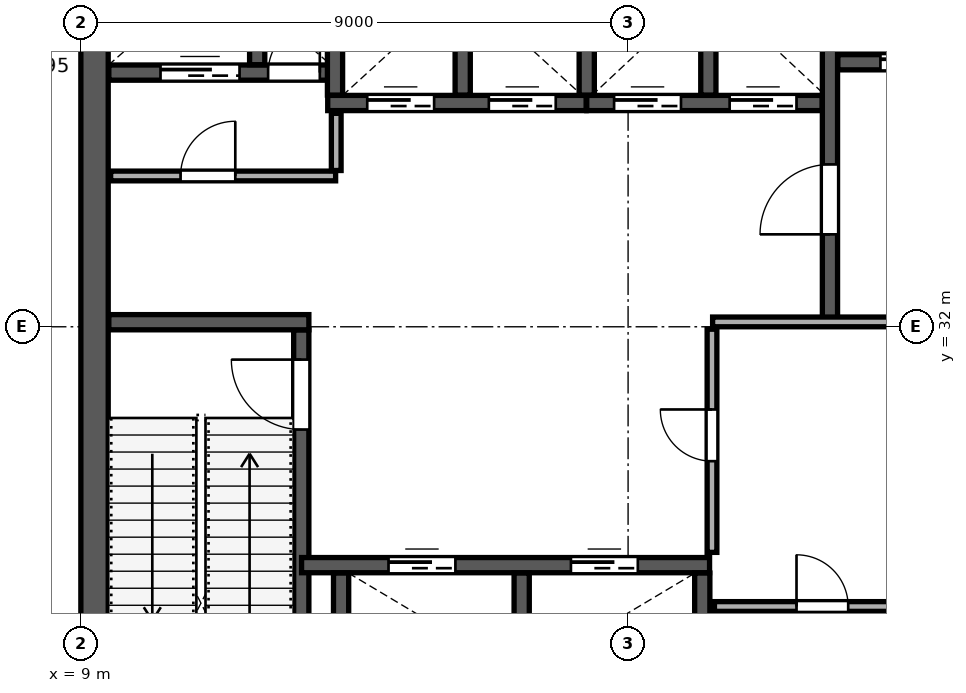
"""IFC4 building model, lengths in metres.
Left out: names, types, materials, properties, quantities, classifications, styles, units other than length and angle.
Written with IfcOpenShell. Run it as: python <this file> out.ifc"""

import sys

from ifc_helpers import new_model, si_unit, direction, frame, frame_2d, origin, place, context, subcontext, project, spatial, rectangle, extrude, source, transform, mapped, element, fill, save


model = new_model("IFC4")
c1 = context("Model", 3, precision=1e-05, world=origin(), true_north=direction((0.0, 1.0)))
c2 = subcontext(c1, "Body", "Model", "MODEL_VIEW")
j1 = project(units=[si_unit("LENGTHUNIT", "METRE"), si_unit("PLANEANGLEUNIT", "RADIAN")], contexts=[c1])
p1 = place(None, origin())
s1 = spatial("IfcSite", under=j1, at=p1, CompositionType="ELEMENT")
p2 = place(p1, origin())
s2 = spatial("IfcBuilding", under=s1, at=p2, CompositionType="ELEMENT")
p3 = place(p2, frame((0.0, 0.0, 127.6)))
s3 = spatial("IfcBuildingStorey", under=s2, at=p3, CompositionType="ELEMENT", Elevation=127.6)
p4 = place(p3, frame((9.225, 24.45, 0.0), z_axis=(0.0, 0.0, 1.0), x_axis=(0.0, 1.0, 0.0)))
e1 = element("IfcWall", 1, at=p4, inside=s3, PredefinedType="SHEAR", context=c2, shape_type="SweptSolid", body=[
    extrude(rectangle(XDim=15.1, YDim=0.45, at=frame_2d((7.55, 0.0))), origin(), (0.0, 0.0, 1.0), 5.16),
])
p5 = place(p3, frame((12.625, 24.46, 0.0), z_axis=(0.0, 0.0, 1.0), x_axis=(0.0, 1.0, 0.0)))
e2 = element("IfcWall", 2, at=p5, inside=s3, PredefinedType="SHEAR", context=c2, shape_type="SweptSolid", body=[
    extrude(rectangle(XDim=7.49, YDim=0.25, at=frame_2d((3.745, 0.0))), origin(), (0.0, 0.0, 1.0), 5.16),
])
p6 = place(p5, frame((5.85, 0.0, 0.0)))
e3 = element("IfcOpeningElement", 3, at=p6, cuts=e2, PredefinedType="OPENING", context=c2, shape_type="SweptSolid", body=[
    extrude(rectangle(XDim=1.15, YDim=2.2, at=frame_2d((0.575, 1.1))), frame((0.0, 0.135, 0.0), z_axis=(0.0, -1.0, 0.0), x_axis=(1.0, 0.0, 0.0)), (0.0, 0.0, 1.0), 0.27),
])
p7 = place(p3, frame((9.46, 32.075, 0.0), z_axis=(0.0, 0.0, 1.0), x_axis=(1.0, 0.0, 0.0)))
e4 = element("IfcWall", 4, at=p7, inside=s3, PredefinedType="SHEAR", context=c2, shape_type="SweptSolid", body=[
    extrude(rectangle(XDim=3.29, YDim=0.25, at=frame_2d((1.645, 0.0))), origin(), (0.0, 0.0, 1.0), 5.16),
])
p8 = place(p3, frame((21.32, 32.12, 0.0), z_axis=(0.0, 0.0, 1.0), x_axis=(0.0, 1.0, 0.0)))
e5 = element("IfcWall", 5, at=p8, inside=s3, PredefinedType="SHEAR", context=c2, shape_type="SweptSolid", body=[
    extrude(rectangle(XDim=7.42, YDim=0.25, at=frame_2d((3.71, 0.0))), origin(), (0.0, 0.0, 1.0), 5.16),
])
p9 = place(p8, frame((1.4, 0.0, 0.0)))
e6 = element("IfcOpeningElement", 6, at=p9, cuts=e5, PredefinedType="OPENING", context=c2, shape_type="SweptSolid", body=[
    extrude(rectangle(XDim=1.15, YDim=2.2, at=frame_2d((0.575, 1.1))), frame((0.0, 0.135, 0.0), z_axis=(0.0, -1.0, 0.0), x_axis=(1.0, 0.0, 0.0)), (0.0, 0.0, 1.0), 0.27),
])
p10 = place(p3, frame((9.46, 36.18, 0.0), z_axis=(0.0, 0.0, 1.0), x_axis=(1.0, 0.0, 0.0)))
e7 = element("IfcWall", 7, at=p10, inside=s3, PredefinedType="SHEAR", context=c2, shape_type="SweptSolid", body=[
    extrude(rectangle(XDim=3.79, YDim=0.25, at=frame_2d((1.895, 0.0))), origin(), (0.0, 0.0, 1.0), 5.16),
])
p11 = place(p10, frame((2.62, 0.0, 0.0)))
e8 = element("IfcOpeningElement", 8, at=p11, cuts=e7, PredefinedType="OPENING", context=c2, shape_type="SweptSolid", body=[
    extrude(rectangle(XDim=0.85, YDim=2.1, at=frame_2d((0.425, 1.05))), frame((0.0, 0.135, 0.0), z_axis=(0.0, -1.0, 0.0), x_axis=(1.0, 0.0, 0.0)), (0.0, 0.0, 1.0), 0.27),
])
p12 = place(p10, frame((0.85, 0.0, 0.0)))
e9 = element("IfcOpeningElement", 9, at=p12, cuts=e7, PredefinedType="OPENING", context=c2, shape_type="SweptSolid", body=[
    extrude(rectangle(XDim=1.3, YDim=2.25, at=frame_2d((0.65, 1.125))), frame((0.0, 0.135, 0.0), z_axis=(0.0, -1.0, 0.0), x_axis=(1.0, 0.0, 0.0)), (0.0, 0.0, 1.0), 0.27),
])
p13 = place(p3, frame((11.9, 36.31, 0.0), z_axis=(0.0, 0.0, 1.0), x_axis=(0.0, 1.0, 0.0)))
e10 = element("IfcWall", 10, at=p13, inside=s3, PredefinedType="SHEAR", context=c2, shape_type="SweptSolid", body=[
    extrude(rectangle(XDim=3.23, YDim=0.25, at=frame_2d((1.615, 0.0))), origin(), (0.0, 0.0, 1.0), 5.16),
])
p14 = place(p3, frame((21.45, 36.35, 0.0), z_axis=(0.0, 0.0, 1.0), x_axis=(1.0, 0.0, 0.0)))
e11 = element("IfcWall", 11, at=p14, inside=s3, PredefinedType="SHEAR", context=c2, shape_type="SweptSolid", body=[
    extrude(rectangle(XDim=5.09, YDim=0.25, at=frame_2d((2.545, 0.0))), origin(), (0.0, 0.0, 1.0), 5.16),
])
p15 = place(p14, frame((0.7, 0.0, 0.0)))
e12 = element("IfcOpeningElement", 12, at=p15, cuts=e11, PredefinedType="OPENING", context=c2, shape_type="SweptSolid", body=[
    extrude(rectangle(XDim=1.2, YDim=2.2, at=frame_2d((0.6, 1.1))), frame((0.0, 0.135, 0.0), z_axis=(0.0, -1.0, 0.0), x_axis=(1.0, 0.0, 0.0)), (0.0, 0.0, 1.0), 0.27),
])
p16 = place(p14, frame((3.25, 0.0, 0.0)))
e13 = element("IfcOpeningElement", 13, at=p16, cuts=e11, PredefinedType="OPENING", context=c2, shape_type="SweptSolid", body=[
    extrude(rectangle(XDim=1.2, YDim=2.2, at=frame_2d((0.6, 1.1))), frame((0.0, 0.135, 0.0), z_axis=(0.0, -1.0, 0.0), x_axis=(1.0, 0.0, 0.0)), (0.0, 0.0, 1.0), 0.27),
])
p17 = place(p3, frame((12.63, 28.08, 0.0), z_axis=(0.0, 0.0, 1.0), x_axis=(1.0, 0.0, 0.0)))
e14 = element("IfcWall", 14, at=p17, inside=s3, PredefinedType="SHEAR", context=c2, shape_type="SweptSolid", body=[
    extrude(rectangle(XDim=6.71, YDim=0.25, at=frame_2d((3.355, 0.0))), origin(), (0.0, 0.0, 1.0), 5.16),
])
p18 = place(p17, frame((1.43, 0.0, 0.0)))
e15 = element("IfcOpeningElement", 15, at=p18, cuts=e14, PredefinedType="OPENING", context=c2, shape_type="SweptSolid", body=[
    extrude(rectangle(XDim=1.1, YDim=2.2, at=frame_2d((0.55, 1.1))), frame((0.0, 0.135, 0.0), z_axis=(0.0, -1.0, 0.0), x_axis=(1.0, 0.0, 0.0)), (0.0, 0.0, 1.0), 0.27),
])
p19 = place(p17, frame((4.43, 0.0, 0.0)))
e16 = element("IfcOpeningElement", 16, at=p19, cuts=e14, PredefinedType="OPENING", context=c2, shape_type="SweptSolid", body=[
    extrude(rectangle(XDim=1.1, YDim=2.2, at=frame_2d((0.55, 1.1))), frame((0.0, 0.135, 0.0), z_axis=(0.0, -1.0, 0.0), x_axis=(1.0, 0.0, 0.0)), (0.0, 0.0, 1.0), 0.27),
])
for number, where, z_axis, x_axis in (
    (17, (13.28, 24.46, 0.0), (0.0, 0.0, 1.0), (0.0, 1.0, 0.0)),
    (18, (16.25, 24.46, 0.0), (0.0, 0.0, 1.0), (0.0, 1.0, 0.0)),
    (19, (19.22, 24.46, 0.0), (0.0, 0.0, 1.0), (0.0, 1.0, 0.0)),
):
    element("IfcWall", number, at=place(p3, frame(where, z_axis=z_axis, x_axis=x_axis)), inside=s3, PredefinedType="SHEAR", context=c2, shape_type="SweptSolid", body=[
        extrude(rectangle(XDim=3.49, YDim=0.25, at=frame_2d((1.745, 0.0))), origin(), (0.0, 0.0, 1.0), 5.16),
    ])
p20 = place(p3, frame((13.06, 35.68, 0.0), z_axis=(0.0, 0.0, 1.0), x_axis=(1.0, 0.0, 0.0)))
e20 = element("IfcWall", 20, at=p20, inside=s3, PredefinedType="SHEAR", context=c2, shape_type="SweptSolid", body=[
    extrude(rectangle(XDim=4.25, YDim=0.25, at=frame_2d((2.125, 0.0))), origin(), (0.0, 0.0, 1.0), 5.16),
])
p21 = place(p20, frame((0.65, 0.0, 0.0)))
e21 = element("IfcOpeningElement", 21, at=p21, cuts=e20, PredefinedType="OPENING", context=c2, shape_type="SweptSolid", body=[
    extrude(rectangle(XDim=1.1, YDim=2.2, at=frame_2d((0.55, 1.1))), frame((0.0, 0.135, 0.0), z_axis=(0.0, -1.0, 0.0), x_axis=(1.0, 0.0, 0.0)), (0.0, 0.0, 1.0), 0.27),
])
p22 = place(p20, frame((2.65, 0.0, 0.0)))
e22 = element("IfcOpeningElement", 22, at=p22, cuts=e20, PredefinedType="OPENING", context=c2, shape_type="SweptSolid", body=[
    extrude(rectangle(XDim=1.1, YDim=2.2, at=frame_2d((0.55, 1.1))), frame((0.0, 0.135, 0.0), z_axis=(0.0, -1.0, 0.0), x_axis=(1.0, 0.0, 0.0)), (0.0, 0.0, 1.0), 0.27),
])
for number, where, z_axis, x_axis in (
    (23, (13.18, 35.81, 0.0), (0.0, 0.0, 1.0), (0.0, 1.0, 0.0)),
    (24, (15.28, 35.81, 0.0), (0.0, 0.0, 1.0), (0.0, 1.0, 0.0)),
):
    element("IfcWall", number, at=place(p3, frame(where, z_axis=z_axis, x_axis=x_axis)), inside=s3, PredefinedType="SHEAR", context=c2, shape_type="SweptSolid", body=[
        extrude(rectangle(XDim=3.73, YDim=0.25, at=frame_2d((1.865, 0.0))), origin(), (0.0, 0.0, 1.0), 5.16),
    ])
p23 = place(p3, frame((17.32, 35.68, 0.0), z_axis=(0.0, 0.0, 1.0), x_axis=(1.0, 0.0, 0.0)))
e25 = element("IfcWall", 25, at=p23, inside=s3, PredefinedType="SHEAR", context=c2, shape_type="SweptSolid", body=[
    extrude(rectangle(XDim=3.87, YDim=0.25, at=frame_2d((1.935, 0.0))), origin(), (0.0, 0.0, 1.0), 5.16),
])
p24 = place(p23, frame((0.45, 0.0, 0.0)))
e26 = element("IfcOpeningElement", 26, at=p24, cuts=e25, PredefinedType="OPENING", context=c2, shape_type="SweptSolid", body=[
    extrude(rectangle(XDim=1.1, YDim=2.2, at=frame_2d((0.55, 1.1))), frame((0.0, 0.135, 0.0), z_axis=(0.0, -1.0, 0.0), x_axis=(1.0, 0.0, 0.0)), (0.0, 0.0, 1.0), 0.27),
])
p25 = place(p23, frame((2.35, 0.0, 0.0)))
e27 = element("IfcOpeningElement", 27, at=p25, cuts=e25, PredefinedType="OPENING", context=c2, shape_type="SweptSolid", body=[
    extrude(rectangle(XDim=1.1, YDim=2.2, at=frame_2d((0.55, 1.1))), frame((0.0, 0.135, 0.0), z_axis=(0.0, -1.0, 0.0), x_axis=(1.0, 0.0, 0.0)), (0.0, 0.0, 1.0), 0.27),
])
for number, where, z_axis, x_axis in (
    (28, (17.32, 35.81, 0.0), (0.0, 0.0, 1.0), (0.0, 1.0, 0.0)),
    (29, (19.32, 35.81, 0.0), (0.0, 0.0, 1.0), (0.0, 1.0, 0.0)),
):
    element("IfcWall", number, at=place(p3, frame(where, z_axis=z_axis, x_axis=x_axis)), inside=s3, PredefinedType="SHEAR", context=c2, shape_type="SweptSolid", body=[
        extrude(rectangle(XDim=3.73, YDim=0.25, at=frame_2d((1.865, 0.0))), origin(), (0.0, 0.0, 1.0), 5.16),
    ])
p26 = place(p3, frame((9.49, 34.48, 0.0), z_axis=(0.0, 0.0, 1.0), x_axis=(1.0, 0.0, 0.0)))
e30 = element("IfcWall", 30, at=p26, inside=s3, PredefinedType="PARTITIONING", context=c2, shape_type="SweptSolid", body=[
    extrude(rectangle(XDim=3.7, YDim=0.16, at=frame_2d((1.85, 0.0))), origin(), (0.0, 0.0, 1.0), 5.16),
])
p27 = place(p26, frame((1.15, 0.0, 0.0)))
e31 = element("IfcOpeningElement", 31, at=p27, cuts=e30, PredefinedType="OPENING", context=c2, shape_type="SweptSolid", body=[
    extrude(rectangle(XDim=0.9, YDim=2.15, at=frame_2d((0.45, 1.075))), frame((0.0, 0.09, 0.0), z_axis=(0.0, -1.0, 0.0), x_axis=(1.0, 0.0, 0.0)), (0.0, 0.0, 1.0), 0.18),
])
p28 = place(p3, frame((13.2, 34.57, 0.0), z_axis=(0.0, 0.0, 1.0), x_axis=(0.0, 1.0, 0.0)))
e32 = element("IfcWall", 32, at=p28, inside=s3, PredefinedType="PARTITIONING", context=c2, shape_type="SweptSolid", body=[
    extrude(rectangle(XDim=0.94, YDim=0.16, at=frame_2d((0.47, 0.0))), origin(), (0.0, 0.0, 1.0), 5.16),
])
p29 = place(p3, frame((19.39, 32.08, 0.0), z_axis=(0.0, 0.0, 1.0), x_axis=(1.0, 0.0, 0.0)))
e33 = element("IfcWall", 33, at=p29, inside=s3, PredefinedType="PARTITIONING", context=c2, shape_type="SweptSolid", body=[
    extrude(rectangle(XDim=3.82, YDim=0.16, at=frame_2d((1.91, 0.0))), origin(), (0.0, 0.0, 1.0), 5.16),
])
p30 = place(p3, frame((19.38, 28.29, 0.0), z_axis=(0.0, 0.0, 1.0), x_axis=(0.0, 1.0, 0.0)))
e34 = element("IfcWall", 34, at=p30, inside=s3, PredefinedType="PARTITIONING", context=c2, shape_type="SweptSolid", body=[
    extrude(rectangle(XDim=3.67, YDim=0.16, at=frame_2d((1.835, 0.0))), origin(), (0.0, 0.0, 1.0), 5.16),
])
p31 = place(p30, frame((1.5, 0.0, 0.0)))
e35 = element("IfcOpeningElement", 35, at=p31, cuts=e34, PredefinedType="OPENING", context=c2, shape_type="SweptSolid", body=[
    extrude(rectangle(XDim=0.85, YDim=2.1, at=frame_2d((0.425, 1.05))), frame((0.0, 0.09, 0.0), z_axis=(0.0, -1.0, 0.0), x_axis=(1.0, 0.0, 0.0)), (0.0, 0.0, 1.0), 0.18),
])
p32 = place(p3, frame((19.42, 27.4, 0.0), z_axis=(0.0, 0.0, 1.0), x_axis=(1.0, 0.0, 0.0)))
e36 = element("IfcWall", 36, at=p32, inside=s3, PredefinedType="PARTITIONING", context=c2, shape_type="SweptSolid", body=[
    extrude(rectangle(XDim=3.72, YDim=0.16, at=frame_2d((1.86, 0.0))), origin(), (0.0, 0.0, 1.0), 5.16),
])
p33 = place(p32, frame((1.35, 0.0, 0.0)))
e37 = element("IfcOpeningElement", 37, at=p33, cuts=e36, PredefinedType="OPENING", context=c2, shape_type="SweptSolid", body=[
    extrude(rectangle(XDim=0.85, YDim=2.1, at=frame_2d((0.425, 1.05))), frame((0.0, 0.09, 0.0), z_axis=(0.0, -1.0, 0.0), x_axis=(1.0, 0.0, 0.0)), (0.0, 0.0, 1.0), 0.18),
])
p34 = place(p3, frame((0.861, 24.56, 0.0), z_axis=(0.0, 0.0, 1.0), x_axis=(0.342022409736, 0.939691795877, 0.0)))
e38 = element("IfcWall", 38, at=p34, inside=s3, PredefinedType="PARTITIONING", context=c2, shape_type="SweptSolid", body=[
    extrude(rectangle(XDim=24.91, YDim=0.1, at=frame_2d((12.455, 0.0))), origin(), (0.0, 0.0, 1.0), 4.395),
])
p35 = place(p34, frame((3.0, 0.0, 0.0)))
e39 = element("IfcOpeningElement", 39, at=p35, cuts=e38, PredefinedType="OPENING", context=c2, shape_type="SweptSolid", body=[
    extrude(rectangle(XDim=0.95, YDim=2.15, at=frame_2d((0.475, 1.075))), frame((0.0, 0.06, 0.0), z_axis=(0.0, -1.0, 0.0), x_axis=(1.0, 0.0, 0.0)), (0.0, 0.0, 1.0), 0.12),
])
m1 = source(origin(), c2, "Body", "SweptSolid", [
    extrude(rectangle(XDim=1.15, YDim=2.2, at=frame_2d((0.575, 1.1))), frame((0.0, 0.025, 0.0), z_axis=(0.0, -1.0, 0.0), x_axis=(1.0, 0.0, 0.0)), (0.0, 0.0, 1.0), 0.05),
])
p36 = place(p6, origin())
e40 = element("IfcDoor", 40, at=p36, inside=s3, OperationType="SINGLE_SWING_RIGHT", PredefinedType="DOOR", context=c2, shape_type="MappedRepresentation", body=[
    mapped(m1, transform((0.0, 0.0, 0.0), scale=1.0)),
])
fill(e3, e40)
m2 = source(origin(), c2, "Body", "SweptSolid", [
    extrude(rectangle(XDim=1.15, YDim=2.2, at=frame_2d((0.575, 1.1))), frame((0.0, 0.025, 0.0), z_axis=(0.0, -1.0, 0.0), x_axis=(1.0, 0.0, 0.0)), (0.0, 0.0, 1.0), 0.05),
])
p37 = place(p9, origin())
e41 = element("IfcDoor", 41, at=p37, inside=s3, OperationType="SINGLE_SWING_LEFT", PredefinedType="DOOR", context=c2, shape_type="MappedRepresentation", body=[
    mapped(m2, transform((0.0, 0.0, 0.0), scale=1.0)),
])
fill(e6, e41)
m3 = source(origin(), c2, "Body", "SweptSolid", [
    extrude(rectangle(XDim=0.85, YDim=2.1, at=frame_2d((0.425, 1.05))), frame((0.0, 0.025, 0.0), z_axis=(0.0, -1.0, 0.0), x_axis=(1.0, 0.0, 0.0)), (0.0, 0.0, 1.0), 0.05),
])
p38 = place(p11, origin())
e42 = element("IfcDoor", 42, at=p38, inside=s3, OperationType="SINGLE_SWING_RIGHT", PredefinedType="DOOR", context=c2, shape_type="MappedRepresentation", body=[
    mapped(m3, transform((0.0, 0.0, 0.0), scale=1.0)),
])
fill(e8, e42)
m4 = source(origin(), c2, "Body", "SweptSolid", [
    extrude(rectangle(XDim=1.1, YDim=2.2, at=frame_2d((0.55, 1.1))), frame((0.0, 0.025, 0.0), z_axis=(0.0, -1.0, 0.0), x_axis=(1.0, 0.0, 0.0)), (0.0, 0.0, 1.0), 0.05),
])
p39 = place(p18, origin())
e43 = element("IfcDoor", 43, at=p39, inside=s3, OperationType="SLIDING_TO_LEFT", PredefinedType="DOOR", context=c2, shape_type="MappedRepresentation", body=[
    mapped(m4, transform((0.0, 0.0, 0.0), scale=1.0)),
])
fill(e15, e43)
p40 = place(p19, origin())
e44 = element("IfcDoor", 44, at=p40, inside=s3, OperationType="SLIDING_TO_RIGHT", PredefinedType="DOOR", context=c2, shape_type="MappedRepresentation", body=[
    mapped(m4, transform((0.0, 0.0, 0.0), scale=1.0)),
])
fill(e16, e44)
p41 = place(p21, origin())
e45 = element("IfcDoor", 45, at=p41, inside=s3, OperationType="SLIDING_TO_LEFT", PredefinedType="DOOR", context=c2, shape_type="MappedRepresentation", body=[
    mapped(m4, transform((0.0, 0.0, 0.0), scale=1.0)),
])
fill(e21, e45)
p42 = place(p22, origin())
e46 = element("IfcDoor", 46, at=p42, inside=s3, OperationType="SLIDING_TO_RIGHT", PredefinedType="DOOR", context=c2, shape_type="MappedRepresentation", body=[
    mapped(m4, transform((0.0, 0.0, 0.0), scale=1.0)),
])
fill(e22, e46)
p43 = place(p24, origin())
e47 = element("IfcDoor", 47, at=p43, inside=s3, OperationType="SLIDING_TO_LEFT", PredefinedType="DOOR", context=c2, shape_type="MappedRepresentation", body=[
    mapped(m4, transform((0.0, 0.0, 0.0), scale=1.0)),
])
fill(e26, e47)
p44 = place(p25, origin())
e48 = element("IfcDoor", 48, at=p44, inside=s3, OperationType="SLIDING_TO_RIGHT", PredefinedType="DOOR", context=c2, shape_type="MappedRepresentation", body=[
    mapped(m4, transform((0.0, 0.0, 0.0), scale=1.0)),
])
fill(e27, e48)
m5 = source(origin(), c2, "Body", "SweptSolid", [
    extrude(rectangle(XDim=1.2, YDim=2.2, at=frame_2d((0.6, 1.1))), frame((0.0, 0.025, 0.0), z_axis=(0.0, -1.0, 0.0), x_axis=(1.0, 0.0, 0.0)), (0.0, 0.0, 1.0), 0.05),
])
p45 = place(p15, origin())
e49 = element("IfcDoor", 49, at=p45, inside=s3, OperationType="SLIDING_TO_LEFT", PredefinedType="DOOR", context=c2, shape_type="MappedRepresentation", body=[
    mapped(m5, transform((0.0, 0.0, 0.0), scale=1.0)),
])
fill(e12, e49)
m6 = source(origin(), c2, "Body", "SweptSolid", [
    extrude(rectangle(XDim=1.3, YDim=2.25, at=frame_2d((0.65, 1.125))), frame((0.0, 0.025, 0.0), z_axis=(0.0, -1.0, 0.0), x_axis=(1.0, 0.0, 0.0)), (0.0, 0.0, 1.0), 0.05),
])
p46 = place(p12, origin())
e50 = element("IfcDoor", 50, at=p46, inside=s3, OperationType="SLIDING_TO_LEFT", PredefinedType="DOOR", context=c2, shape_type="MappedRepresentation", body=[
    mapped(m6, transform((0.0, 0.0, 0.0), scale=1.0)),
])
fill(e9, e50)
m7 = source(origin(), c2, "Body", "SweptSolid", [
    extrude(rectangle(XDim=0.9, YDim=2.15, at=frame_2d((0.45, 1.075))), frame((0.0, 0.025, 0.0), z_axis=(0.0, -1.0, 0.0), x_axis=(1.0, 0.0, 0.0)), (0.0, 0.0, 1.0), 0.05),
])
p47 = place(p27, origin())
e51 = element("IfcDoor", 51, at=p47, inside=s3, OperationType="SINGLE_SWING_RIGHT", PredefinedType="DOOR", context=c2, shape_type="MappedRepresentation", body=[
    mapped(m7, transform((0.0, 0.0, 0.0), scale=1.0)),
])
fill(e31, e51)
p48 = place(p33, origin())
e52 = element("IfcDoor", 52, at=p48, inside=s3, OperationType="SINGLE_SWING_LEFT", PredefinedType="DOOR", context=c2, shape_type="MappedRepresentation", body=[
    mapped(m3, transform((0.0, 0.0, 0.0), scale=1.0)),
])
fill(e37, e52)
p49 = place(p31, origin())
e53 = element("IfcDoor", 53, at=p49, inside=s3, OperationType="SINGLE_SWING_RIGHT", PredefinedType="DOOR", context=c2, shape_type="MappedRepresentation", body=[
    mapped(m3, transform((0.0, 0.0, 0.0), scale=1.0)),
])
fill(e35, e53)
save(model, sys.argv[1])
